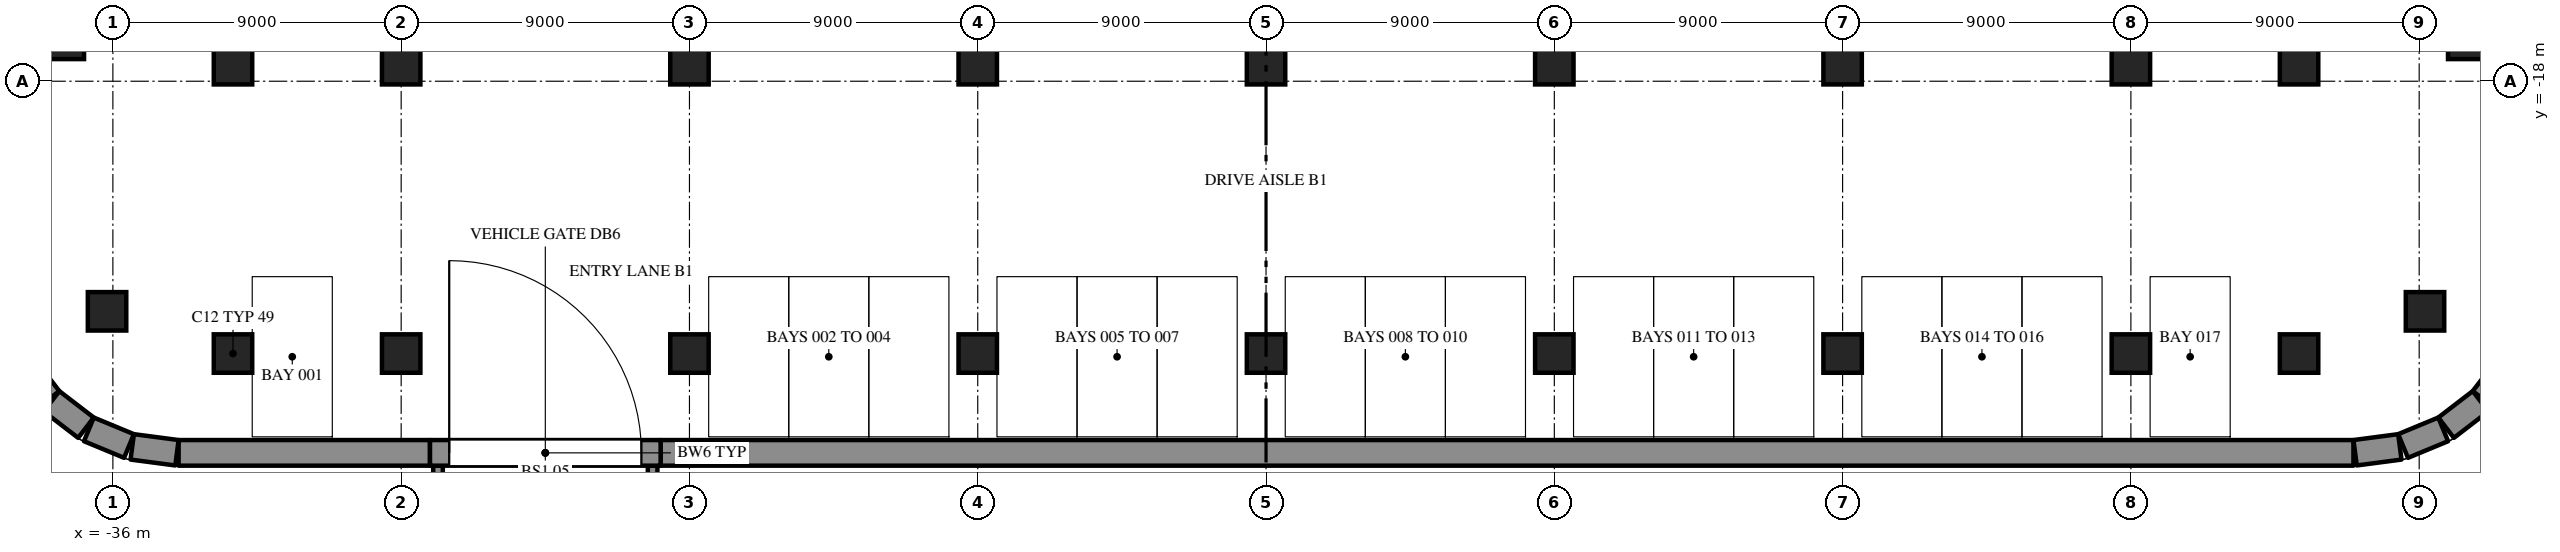
"""IFC4 building model, lengths in metres.
Left out: names, types, materials, properties, quantities, classifications, styles, units other than length and angle.
Written with IfcOpenShell. Run it as: python <this file> out.ifc"""

import sys

from ifc_helpers import new_model, si_unit, direction, frame, frame_2d, origin, origin_2d, place, context, subcontext, project, spatial, rectangle, extrude, element, fill, save


model = new_model("IFC4")
c1 = context("Model", 3, precision=1e-05, world=origin(), true_north=direction((0.0, 1.0)))
c2 = subcontext(c1, "Body", "Model", "MODEL_VIEW")
j1 = project(units=[si_unit("LENGTHUNIT", "METRE"), si_unit("PLANEANGLEUNIT", "RADIAN")], contexts=[c1])
p1 = place(None, origin())
s1 = spatial("IfcSite", under=j1, at=p1, CompositionType="ELEMENT")
p2 = place(p1, origin())
s2 = spatial("IfcBuilding", under=s1, at=p2, CompositionType="ELEMENT")
p3 = place(p2, frame((0.0, 0.0, -4.2)))
s3 = spatial("IfcBuildingStorey", under=s2, at=p3, CompositionType="ELEMENT", Elevation=-4.2)
p4 = place(p3, frame((-33.948, -29.6, 0.0), z_axis=(0.0, 0.0, 1.0), x_axis=(1.0, 0.0, 0.0)))
e1 = element("IfcWall", 1, at=p4, inside=s3, PredefinedType="SOLIDWALL", context=c2, shape_type="SweptSolid", body=[
    extrude(rectangle(XDim=7.847, YDim=0.8, at=frame_2d((3.924, 0.0))), origin(), (0.0, 0.0, 1.0), 4.2),
])
p5 = place(p3, frame((-18.9, -29.6, 0.0), z_axis=(0.0, 0.0, 1.0), x_axis=(1.0, 0.0, 0.0)))
e2 = element("IfcWall", 2, at=p5, inside=s3, PredefinedType="SOLIDWALL", context=c2, shape_type="SweptSolid", body=[
    extrude(rectangle(XDim=52.847, YDim=0.8, at=frame_2d((26.424, 0.0))), origin(), (0.0, 0.0, 1.0), 4.2),
])
p6 = place(p3, frame((-34.0, -29.597, 0.0), z_axis=(0.0, 0.0, 1.0), x_axis=(-0.99144603414, 0.130517283865, 0.0)))
e3 = element("IfcWall", 3, at=p6, inside=s3, PredefinedType="SOLIDWALL", context=c2, shape_type="SweptSolid", body=[
    extrude(rectangle(XDim=1.408, YDim=0.8, at=frame_2d((0.704, 0.0))), origin(), (0.0, 0.0, 1.0), 4.2),
])
for number, where, z_axis, x_axis in (
    (4, (-35.497, -29.386, 0.0), (0.0, 0.0, 1.0), (-0.924, 0.383, 0.0)),
    (5, (-36.84, -28.815, 0.0), (0.0, 0.0, 1.0), (-0.793, 0.609, 0.0)),
    (6, (-37.99, -27.916, 0.0), (0.0, 0.0, 1.0), (-0.609, 0.793, 0.0)),
    (7, (38.815, -26.84, 0.0), (0.0, 0.0, 1.0), (-0.609, -0.793, 0.0)),
    (8, (37.916, -27.99, 0.0), (0.0, 0.0, 1.0), (-0.793, -0.609, 0.0)),
    (9, (36.75, -28.867, 0.0), (0.0, 0.0, 1.0), (-0.924, -0.383, 0.0)),
):
    element("IfcWall", number, at=place(p3, frame(where, z_axis=z_axis, x_axis=x_axis)), inside=s3, PredefinedType="SOLIDWALL", context=c2, shape_type="SweptSolid", body=[
        extrude(rectangle(XDim=1.355, YDim=0.8, at=frame_2d((0.678, 0.0))), origin(), (0.0, 0.0, 1.0), 4.2),
    ])
p7 = place(p3, frame((35.396, -29.413, 0.0), z_axis=(0.0, 0.0, 1.0), x_axis=(-0.99144603414, -0.130517283865, 0.0)))
e10 = element("IfcWall", 10, at=p7, inside=s3, PredefinedType="SOLIDWALL", context=c2, shape_type="SweptSolid", body=[
    extrude(rectangle(XDim=1.408, YDim=0.8, at=frame_2d((0.704, 0.0))), origin(), (0.0, 0.0, 1.0), 4.2),
])
for number, where, z_axis, x_axis in (
    (11, (-32.25, -26.5, 0.0), (0.0, 0.0, 1.0), (1.0, 0.0, 0.0)),
    (12, (-27.0, -26.5, 0.0), (0.0, 0.0, 1.0), (1.0, 0.0, 0.0)),
    (13, (-18.0, -26.5, 0.0), (0.0, 0.0, 1.0), (1.0, 0.0, 0.0)),
    (14, (-9.0, -26.5, 0.0), (0.0, 0.0, 1.0), (1.0, 0.0, 0.0)),
    (15, (0.0, -26.5, 0.0), (0.0, 0.0, 1.0), (1.0, 0.0, 0.0)),
    (16, (9.0, -26.5, 0.0), (0.0, 0.0, 1.0), (1.0, 0.0, 0.0)),
    (17, (18.0, -26.5, 0.0), (0.0, 0.0, 1.0), (1.0, 0.0, 0.0)),
    (18, (27.0, -26.5, 0.0), (0.0, 0.0, 1.0), (1.0, 0.0, 0.0)),
    (19, (32.25, -26.5, 0.0), (0.0, 0.0, 1.0), (1.0, 0.0, 0.0)),
    (20, (-36.182, -25.182, 0.0), (0.0, 0.0, 1.0), (1.0, 0.0, 0.0)),
    (21, (36.182, -25.182, 0.0), (0.0, 0.0, 1.0), (1.0, 0.0, 0.0)),
    (22, (-32.25, -17.5, 0.0), (0.0, 0.0, 1.0), (1.0, 0.0, 0.0)),
    (23, (-27.0, -17.5, 0.0), (0.0, 0.0, 1.0), (1.0, 0.0, 0.0)),
    (24, (-18.0, -17.5, 0.0), (0.0, 0.0, 1.0), (1.0, 0.0, 0.0)),
    (25, (-9.0, -17.5, 0.0), (0.0, 0.0, 1.0), (1.0, 0.0, 0.0)),
    (26, (0.0, -17.5, 0.0), (0.0, 0.0, 1.0), (1.0, 0.0, 0.0)),
    (27, (9.0, -17.5, 0.0), (0.0, 0.0, 1.0), (1.0, 0.0, 0.0)),
    (28, (18.0, -17.5, 0.0), (0.0, 0.0, 1.0), (1.0, 0.0, 0.0)),
    (29, (27.0, -17.5, 0.0), (0.0, 0.0, 1.0), (1.0, 0.0, 0.0)),
    (30, (32.25, -17.5, 0.0), (0.0, 0.0, 1.0), (1.0, 0.0, 0.0)),
    (31, (-37.5, -16.709, 0.0), (0.0, 0.0, 1.0), (1.0, 0.0, 0.0)),
    (32, (37.5, -16.709, 0.0), (0.0, 0.0, 1.0), (1.0, 0.0, 0.0)),
):
    element("IfcColumn", number, at=place(p3, frame(where, z_axis=z_axis, x_axis=x_axis)), inside=s3, PredefinedType="COLUMN", context=c2, shape_type="SweptSolid", body=[
        extrude(rectangle(XDim=1.2, YDim=1.2, at=origin_2d()), origin(), (0.0, 0.0, 1.0), 4.2),
    ])
p8 = place(p3, frame((-25.85, -43.3, -0.3), z_axis=(0.0, 0.0, 1.0), x_axis=(0.0, 1.0, 0.0)))
e33 = element("IfcWall", 33, at=p8, inside=s3, PredefinedType="SOLIDWALL", context=c2, shape_type="SweptSolid", body=[
    extrude(rectangle(XDim=13.3, YDim=0.3, at=frame_2d((6.65, 0.0))), origin(), (0.0, 0.0, 1.0), 5.6),
])
p9 = place(p3, frame((-19.15, -36.3, -0.3), z_axis=(0.0, 0.0, 1.0), x_axis=(0.0, 1.0, 0.0)))
e34 = element("IfcWall", 34, at=p9, inside=s3, PredefinedType="SOLIDWALL", context=c2, shape_type="SweptSolid", body=[
    extrude(rectangle(XDim=6.3, YDim=0.3, at=frame_2d((3.15, 0.0))), origin(), (0.0, 0.0, 1.0), 5.6),
])
p10 = place(p3, frame((-26.1, -29.6, 0.0), z_axis=(0.0, 0.0, 1.0), x_axis=(1.0, 0.0, 0.0)))
e35 = element("IfcWall", 35, at=p10, inside=s3, PredefinedType="SOLIDWALL", context=c2, shape_type="SweptSolid", body=[
    extrude(rectangle(XDim=7.2, YDim=0.8, at=frame_2d((3.6, 0.0))), origin(), (0.0, 0.0, 1.0), 4.2),
])
p11 = place(p10, frame((0.6, 0.0, 0.0)))
e36 = element("IfcOpeningElement", 36, at=p11, cuts=e35, PredefinedType="OPENING", context=c2, shape_type="SweptSolid", body=[
    extrude(rectangle(XDim=6.0, YDim=3.2, at=frame_2d((3.0, 1.6))), frame((0.0, 0.412, 0.0), z_axis=(0.0, -1.0, 0.0), x_axis=(1.0, 0.0, 0.0)), (0.0, 0.0, 1.0), 0.824),
])
p12 = place(p11, origin())
e37 = element("IfcDoor", 37, at=p12, inside=s3, OperationType="SINGLE_SWING_LEFT", PredefinedType="GATE", context=c2, shape_type="SweptSolid", body=[
    extrude(rectangle(XDim=6.0, YDim=3.2, at=frame_2d((3.0, 1.6))), frame((0.0, 0.025, 0.0), z_axis=(0.0, -1.0, 0.0), x_axis=(1.0, 0.0, 0.0)), (0.0, 0.0, 1.0), 0.05),
])
fill(e36, e37)
save(model, sys.argv[1])
